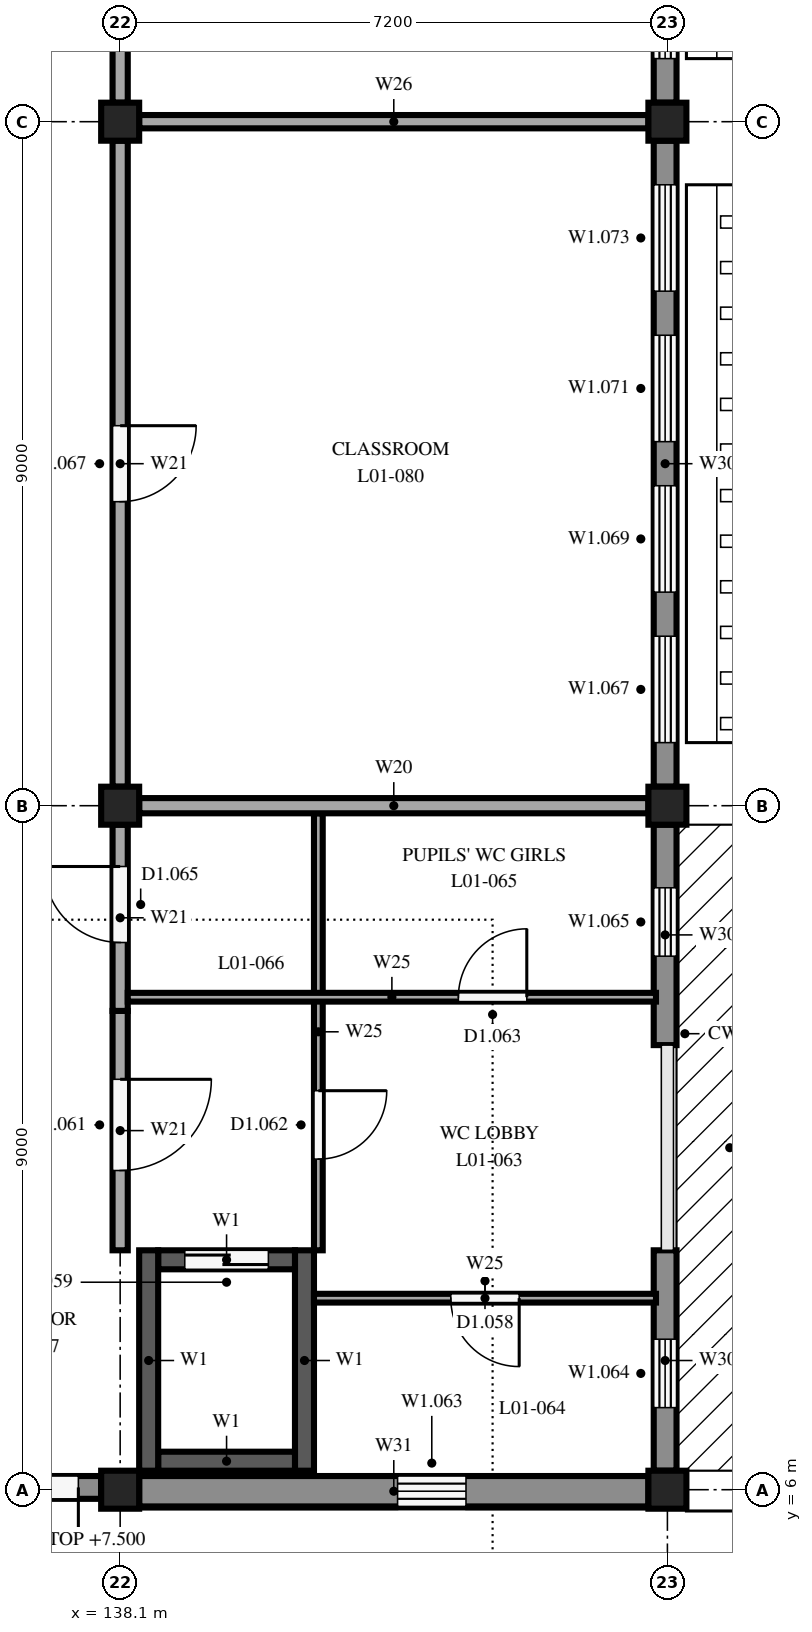
"""IFC4 building model, lengths in metres.
Left out: names, types, materials, properties, quantities, classifications, styles, units other than length and angle.
Written with IfcOpenShell. Run it as: python <this file> out.ifc"""

import sys

from ifc_helpers import new_model, si_unit, direction, frame, frame_2d, origin, origin_2d, place, context, subcontext, project, spatial, rectangle, extrude, element, fill, save


model = new_model("IFC4")
c1 = context("Model", 3, precision=1e-05, world=origin(), true_north=direction((0.0, 1.0)))
c2 = subcontext(c1, "Body", "Model", "MODEL_VIEW")
j1 = project(units=[si_unit("LENGTHUNIT", "METRE"), si_unit("PLANEANGLEUNIT", "RADIAN")], contexts=[c1])
p1 = place(None, origin())
s1 = spatial("IfcSite", under=j1, at=p1, CompositionType="ELEMENT")
p2 = place(p1, origin())
s2 = spatial("IfcBuilding", under=s1, at=p2, CompositionType="ELEMENT")
p3 = place(p2, frame((0.0, 0.0, 4.5)))
s3 = spatial("IfcBuildingStorey", under=s2, at=p3, CompositionType="ELEMENT", Elevation=4.5)
for number, where, z_axis, x_axis in (
    (1, (138.1, 6.0, 0.0), (0.0, 0.0, 1.0), (1.0, 0.0, 0.0)),
    (2, (138.1, 15.0, 0.0), (0.0, 0.0, 1.0), (1.0, 0.0, 0.0)),
    (3, (138.1, 24.0, 0.0), (0.0, 0.0, 1.0), (1.0, 0.0, 0.0)),
    (4, (145.3, 6.0, 0.0), (0.0, 0.0, 1.0), (1.0, 0.0, 0.0)),
    (5, (145.3, 15.0, 0.0), (0.0, 0.0, 1.0), (1.0, 0.0, 0.0)),
    (6, (145.3, 24.0, 0.0), (0.0, 0.0, 1.0), (1.0, 0.0, 0.0)),
):
    element("IfcColumn", number, at=place(p3, frame(where, z_axis=z_axis, x_axis=x_axis)), inside=s3, PredefinedType="COLUMN", context=c2, shape_type="SweptSolid", body=[
        extrude(rectangle(XDim=0.5, YDim=0.5, at=origin_2d()), origin(), (0.0, 0.0, 1.0), 3.35),
    ])
for number, where, z_axis, x_axis in (
    (7, (138.475, 6.25, 0.0), (0.0, 0.0, 1.0), (0.0, 1.0, 0.0)),
    (8, (140.525, 6.25, 0.0), (0.0, 0.0, 1.0), (0.0, 1.0, 0.0)),
):
    element("IfcWall", number, at=place(p3, frame(where, z_axis=z_axis, x_axis=x_axis)), inside=s3, PredefinedType="SHEAR", context=c2, shape_type="SweptSolid", body=[
        extrude(rectangle(XDim=2.9, YDim=0.25, at=frame_2d((1.45, 0.0))), origin(), (0.0, 0.0, 1.0), 3.35),
    ])
p4 = place(p3, frame((138.6, 6.375, 0.0), z_axis=(0.0, 0.0, 1.0), x_axis=(1.0, 0.0, 0.0)))
e9 = element("IfcWall", 9, at=p4, inside=s3, PredefinedType="SHEAR", context=c2, shape_type="SweptSolid", body=[
    extrude(rectangle(XDim=1.8, YDim=0.25, at=frame_2d((0.9, 0.0))), origin(), (0.0, 0.0, 1.0), 3.35),
])
p5 = place(p3, frame((138.6, 9.025, 0.0), z_axis=(0.0, 0.0, 1.0), x_axis=(1.0, 0.0, 0.0)))
e10 = element("IfcWall", 10, at=p5, inside=s3, PredefinedType="SHEAR", context=c2, shape_type="SweptSolid", body=[
    extrude(rectangle(XDim=1.8, YDim=0.25, at=frame_2d((0.9, 0.0))), origin(), (0.0, 0.0, 1.0), 3.35),
])
p6 = place(p5, frame((0.35, 0.0, 0.0)))
e11 = element("IfcOpeningElement", 11, at=p6, cuts=e10, PredefinedType="OPENING", context=c2, shape_type="SweptSolid", body=[
    extrude(rectangle(XDim=1.1, YDim=2.1, at=frame_2d((0.55, 1.05))), frame((0.0, 0.135, 0.0), z_axis=(0.0, -1.0, 0.0), x_axis=(1.0, 0.0, 0.0)), (0.0, 0.0, 1.0), 0.27),
])
p7 = place(p3, frame((145.27, 9.15, 0.0), z_axis=(0.0, 0.0, 1.0), x_axis=(0.0, -1.0, 0.0)))
e12 = element("IfcWall", 12, at=p7, inside=s3, PredefinedType="STANDARD", context=c2, shape_type="SweptSolid", body=[
    extrude(rectangle(XDim=2.9, YDim=0.3, at=frame_2d((1.45, 0.0))), origin(), (0.0, 0.0, 1.0), 2.85),
])
p8 = place(p7, frame((1.17, 0.0, 1.6)))
e13 = element("IfcOpeningElement", 13, at=p8, cuts=e12, PredefinedType="OPENING", context=c2, shape_type="SweptSolid", body=[
    extrude(rectangle(XDim=0.9, YDim=1.0, at=frame_2d((0.45, 0.5))), frame((0.0, 0.16, 0.0), z_axis=(0.0, -1.0, 0.0), x_axis=(1.0, 0.0, 0.0)), (0.0, 0.0, 1.0), 0.32),
])
p9 = place(p3, frame((145.27, 14.75, 0.0), z_axis=(0.0, 0.0, 1.0), x_axis=(0.0, -1.0, 0.0)))
e14 = element("IfcWall", 14, at=p9, inside=s3, PredefinedType="STANDARD", context=c2, shape_type="SweptSolid", body=[
    extrude(rectangle(XDim=2.9, YDim=0.3, at=frame_2d((1.45, 0.0))), origin(), (0.0, 0.0, 1.0), 2.85),
])
p10 = place(p9, frame((0.83, 0.0, 1.6)))
e15 = element("IfcOpeningElement", 15, at=p10, cuts=e14, PredefinedType="OPENING", context=c2, shape_type="SweptSolid", body=[
    extrude(rectangle(XDim=0.9, YDim=1.0, at=frame_2d((0.45, 0.5))), frame((0.0, 0.16, 0.0), z_axis=(0.0, -1.0, 0.0), x_axis=(1.0, 0.0, 0.0)), (0.0, 0.0, 1.0), 0.32),
])
p11 = place(p3, frame((145.27, 23.75, 0.0), z_axis=(0.0, 0.0, 1.0), x_axis=(0.0, -1.0, 0.0)))
e16 = element("IfcWall", 16, at=p11, inside=s3, PredefinedType="STANDARD", context=c2, shape_type="SweptSolid", body=[
    extrude(rectangle(XDim=8.5, YDim=0.3, at=frame_2d((4.25, 0.0))), origin(), (0.0, 0.0, 1.0), 2.85),
])
p12 = place(p11, frame((6.52, 0.0, 0.6)))
e17 = element("IfcOpeningElement", 17, at=p12, cuts=e16, PredefinedType="OPENING", context=c2, shape_type="SweptSolid", body=[
    extrude(rectangle(XDim=1.4, YDim=2.2, at=frame_2d((0.7, 1.1))), frame((0.0, 0.16, 0.0), z_axis=(0.0, -1.0, 0.0), x_axis=(1.0, 0.0, 0.0)), (0.0, 0.0, 1.0), 0.32),
])
p13 = place(p11, frame((4.54, 0.0, 0.6)))
e18 = element("IfcOpeningElement", 18, at=p13, cuts=e16, PredefinedType="OPENING", context=c2, shape_type="SweptSolid", body=[
    extrude(rectangle(XDim=1.4, YDim=2.2, at=frame_2d((0.7, 1.1))), frame((0.0, 0.16, 0.0), z_axis=(0.0, -1.0, 0.0), x_axis=(1.0, 0.0, 0.0)), (0.0, 0.0, 1.0), 0.32),
])
p14 = place(p11, frame((2.56, 0.0, 0.6)))
e19 = element("IfcOpeningElement", 19, at=p14, cuts=e16, PredefinedType="OPENING", context=c2, shape_type="SweptSolid", body=[
    extrude(rectangle(XDim=1.4, YDim=2.2, at=frame_2d((0.7, 1.1))), frame((0.0, 0.16, 0.0), z_axis=(0.0, -1.0, 0.0), x_axis=(1.0, 0.0, 0.0)), (0.0, 0.0, 1.0), 0.32),
])
p15 = place(p11, frame((0.58, 0.0, 0.6)))
e20 = element("IfcOpeningElement", 20, at=p15, cuts=e16, PredefinedType="OPENING", context=c2, shape_type="SweptSolid", body=[
    extrude(rectangle(XDim=1.4, YDim=2.2, at=frame_2d((0.7, 1.1))), frame((0.0, 0.16, 0.0), z_axis=(0.0, -1.0, 0.0), x_axis=(1.0, 0.0, 0.0)), (0.0, 0.0, 1.0), 0.32),
])
p16 = place(p3, frame((145.27, 32.75, 0.0), z_axis=(0.0, 0.0, 1.0), x_axis=(0.0, -1.0, 0.0)))
e21 = element("IfcWall", 21, at=p16, inside=s3, PredefinedType="STANDARD", context=c2, shape_type="SweptSolid", body=[
    extrude(rectangle(XDim=8.5, YDim=0.3, at=frame_2d((4.25, 0.0))), origin(), (0.0, 0.0, 1.0), 2.85),
])
p17 = place(p16, frame((6.52, 0.0, 0.6)))
e22 = element("IfcOpeningElement", 22, at=p17, cuts=e21, PredefinedType="OPENING", context=c2, shape_type="SweptSolid", body=[
    extrude(rectangle(XDim=1.4, YDim=2.2, at=frame_2d((0.7, 1.1))), frame((0.0, 0.16, 0.0), z_axis=(0.0, -1.0, 0.0), x_axis=(1.0, 0.0, 0.0)), (0.0, 0.0, 1.0), 0.32),
])
p18 = place(p16, frame((4.54, 0.0, 0.6)))
e23 = element("IfcOpeningElement", 23, at=p18, cuts=e21, PredefinedType="OPENING", context=c2, shape_type="SweptSolid", body=[
    extrude(rectangle(XDim=1.4, YDim=2.2, at=frame_2d((0.7, 1.1))), frame((0.0, 0.16, 0.0), z_axis=(0.0, -1.0, 0.0), x_axis=(1.0, 0.0, 0.0)), (0.0, 0.0, 1.0), 0.32),
])
p19 = place(p16, frame((2.56, 0.0, 0.6)))
e24 = element("IfcOpeningElement", 24, at=p19, cuts=e21, PredefinedType="OPENING", context=c2, shape_type="SweptSolid", body=[
    extrude(rectangle(XDim=1.4, YDim=2.2, at=frame_2d((0.7, 1.1))), frame((0.0, 0.16, 0.0), z_axis=(0.0, -1.0, 0.0), x_axis=(1.0, 0.0, 0.0)), (0.0, 0.0, 1.0), 0.32),
])
p20 = place(p16, frame((0.58, 0.0, 0.6)))
e25 = element("IfcOpeningElement", 25, at=p20, cuts=e21, PredefinedType="OPENING", context=c2, shape_type="SweptSolid", body=[
    extrude(rectangle(XDim=1.4, YDim=2.2, at=frame_2d((0.7, 1.1))), frame((0.0, 0.16, 0.0), z_axis=(0.0, -1.0, 0.0), x_axis=(1.0, 0.0, 0.0)), (0.0, 0.0, 1.0), 0.32),
])
p21 = place(p3, frame((137.85, 6.03, 0.0), z_axis=(0.0, 0.0, 1.0), x_axis=(-1.0, 0.0, 0.0)))
e26 = element("IfcWall", 26, at=p21, inside=s3, PredefinedType="STANDARD", context=c2, shape_type="SweptSolid", body=[
    extrude(rectangle(XDim=2.2, YDim=0.3, at=frame_2d((1.1, 0.0))), origin(), (0.0, 0.0, 1.0), 3.0),
])
p22 = place(p21, frame((0.3, 0.0, 0.0)))
e27 = element("IfcOpeningElement", 27, at=p22, cuts=e26, PredefinedType="OPENING", context=c2, shape_type="SweptSolid", body=[
    extrude(rectangle(XDim=1.6, YDim=2.4, at=frame_2d((0.8, 1.2))), frame((0.0, 0.16, 0.0), z_axis=(0.0, -1.0, 0.0), x_axis=(1.0, 0.0, 0.0)), (0.0, 0.0, 1.0), 0.32),
])
p23 = place(p3, frame((145.05, 5.98, 0.0), z_axis=(0.0, 0.0, 1.0), x_axis=(-1.0, 0.0, 0.0)))
e28 = element("IfcWall", 28, at=p23, inside=s3, PredefinedType="STANDARD", context=c2, shape_type="SweptSolid", body=[
    extrude(rectangle(XDim=6.7, YDim=0.4, at=frame_2d((3.35, 0.0))), origin(), (0.0, 0.0, 1.0), 2.9),
])
p24 = place(p23, frame((2.4, 0.0, 1.6)))
e29 = element("IfcOpeningElement", 29, at=p24, cuts=e28, PredefinedType="OPENING", context=c2, shape_type="SweptSolid", body=[
    extrude(rectangle(XDim=0.9, YDim=1.0, at=frame_2d((0.45, 0.5))), frame((0.0, 0.21, 0.0), z_axis=(0.0, -1.0, 0.0), x_axis=(1.0, 0.0, 0.0)), (0.0, 0.0, 1.0), 0.42),
])
p25 = place(p3, frame((138.1, 12.3, 0.0), z_axis=(0.0, 0.0, 1.0), x_axis=(0.0, -1.0, 0.0)))
e30 = element("IfcWall", 30, at=p25, inside=s3, PredefinedType="PARTITIONING", context=c2, shape_type="SweptSolid", body=[
    extrude(rectangle(XDim=3.15, YDim=0.2, at=frame_2d((1.575, 0.0))), origin(), (0.0, 0.0, 1.0), 2.9),
])
p26 = place(p25, frame((0.9, 0.0, 0.0)))
e31 = element("IfcOpeningElement", 31, at=p26, cuts=e30, PredefinedType="OPENING", context=c2, shape_type="SweptSolid", body=[
    extrude(rectangle(XDim=1.2, YDim=2.1, at=frame_2d((0.6, 1.05))), frame((0.0, 0.11, 0.0), z_axis=(0.0, -1.0, 0.0), x_axis=(1.0, 0.0, 0.0)), (0.0, 0.0, 1.0), 0.22),
])
p27 = place(p3, frame((138.1, 12.3, 0.0), z_axis=(0.0, 0.0, 1.0), x_axis=(0.0, 1.0, 0.0)))
e32 = element("IfcWall", 32, at=p27, inside=s3, PredefinedType="PARTITIONING", context=c2, shape_type="SweptSolid", body=[
    extrude(rectangle(XDim=2.45, YDim=0.2, at=frame_2d((1.225, 0.0))), origin(), (0.0, 0.0, 1.0), 2.9),
])
p28 = place(p27, frame((0.9, 0.0, 0.0)))
e33 = element("IfcOpeningElement", 33, at=p28, cuts=e32, PredefinedType="OPENING", context=c2, shape_type="SweptSolid", body=[
    extrude(rectangle(XDim=1.0, YDim=2.1, at=frame_2d((0.5, 1.05))), frame((0.0, 0.11, 0.0), z_axis=(0.0, -1.0, 0.0), x_axis=(1.0, 0.0, 0.0)), (0.0, 0.0, 1.0), 0.22),
])
p29 = place(p3, frame((138.35, 15.0, 0.0), z_axis=(0.0, 0.0, 1.0), x_axis=(1.0, 0.0, 0.0)))
e34 = element("IfcWall", 34, at=p29, inside=s3, PredefinedType="PARTITIONING", context=c2, shape_type="SweptSolid", body=[
    extrude(rectangle(XDim=6.7, YDim=0.2, at=frame_2d((3.35, 0.0))), origin(), (0.0, 0.0, 1.0), 2.9),
])
p30 = place(p3, frame((140.708, 14.9, 0.0), z_axis=(0.0, 0.0, 1.0), x_axis=(0.0, -1.0, 0.0)))
e35 = element("IfcWall", 35, at=p30, inside=s3, PredefinedType="PARTITIONING", context=c2, shape_type="SweptSolid", body=[
    extrude(rectangle(XDim=5.75, YDim=0.115, at=frame_2d((2.875, 0.0))), origin(), (0.0, 0.0, 1.0), 3.35),
])
p31 = place(p30, frame((3.65, 0.0, 0.0)))
e36 = element("IfcOpeningElement", 36, at=p31, cuts=e35, PredefinedType="OPENING", context=c2, shape_type="SweptSolid", body=[
    extrude(rectangle(XDim=0.9, YDim=2.1, at=frame_2d((0.45, 1.05))), frame((0.0, 0.067, 0.0), z_axis=(0.0, -1.0, 0.0), x_axis=(1.0, 0.0, 0.0)), (0.0, 0.0, 1.0), 0.135),
])
p32 = place(p3, frame((145.15, 8.52, 0.0), z_axis=(0.0, 0.0, 1.0), x_axis=(-1.0, 0.0, 0.0)))
e37 = element("IfcWall", 37, at=p32, inside=s3, PredefinedType="PARTITIONING", context=c2, shape_type="SweptSolid", body=[
    extrude(rectangle(XDim=4.5, YDim=0.115, at=frame_2d((2.25, 0.0))), origin(), (0.0, 0.0, 1.0), 3.35),
])
p33 = place(p32, frame((1.8, 0.0, 0.0)))
e38 = element("IfcOpeningElement", 38, at=p33, cuts=e37, PredefinedType="OPENING", context=c2, shape_type="SweptSolid", body=[
    extrude(rectangle(XDim=0.9, YDim=2.1, at=frame_2d((0.45, 1.05))), frame((0.0, 0.067, 0.0), z_axis=(0.0, -1.0, 0.0), x_axis=(1.0, 0.0, 0.0)), (0.0, 0.0, 1.0), 0.135),
])
p34 = place(p3, frame((138.2, 12.48, 0.0), z_axis=(0.0, 0.0, 1.0), x_axis=(1.0, 0.0, 0.0)))
e39 = element("IfcWall", 39, at=p34, inside=s3, PredefinedType="PARTITIONING", context=c2, shape_type="SweptSolid", body=[
    extrude(rectangle(XDim=6.95, YDim=0.115, at=frame_2d((3.475, 0.0))), origin(), (0.0, 0.0, 1.0), 3.35),
])
p35 = place(p34, frame((4.35, 0.0, 0.0)))
e40 = element("IfcOpeningElement", 40, at=p35, cuts=e39, PredefinedType="OPENING", context=c2, shape_type="SweptSolid", body=[
    extrude(rectangle(XDim=0.9, YDim=2.1, at=frame_2d((0.45, 1.05))), frame((0.0, 0.067, 0.0), z_axis=(0.0, -1.0, 0.0), x_axis=(1.0, 0.0, 0.0)), (0.0, 0.0, 1.0), 0.135),
])
p36 = place(p3, frame((138.1, 23.75, 0.0), z_axis=(0.0, 0.0, 1.0), x_axis=(0.0, -1.0, 0.0)))
e41 = element("IfcWall", 41, at=p36, inside=s3, PredefinedType="PARTITIONING", context=c2, shape_type="SweptSolid", body=[
    extrude(rectangle(XDim=8.5, YDim=0.2, at=frame_2d((4.25, 0.0))), origin(), (0.0, 0.0, 1.0), 2.9),
])
p37 = place(p36, frame((3.75, 0.0, 0.0)))
e42 = element("IfcOpeningElement", 42, at=p37, cuts=e41, PredefinedType="OPENING", context=c2, shape_type="SweptSolid", body=[
    extrude(rectangle(XDim=1.0, YDim=2.1, at=frame_2d((0.5, 1.05))), frame((0.0, 0.11, 0.0), z_axis=(0.0, -1.0, 0.0), x_axis=(1.0, 0.0, 0.0)), (0.0, 0.0, 1.0), 0.22),
])
p38 = place(p3, frame((138.1, 32.75, 0.0), z_axis=(0.0, 0.0, 1.0), x_axis=(0.0, -1.0, 0.0)))
e43 = element("IfcWall", 43, at=p38, inside=s3, PredefinedType="PARTITIONING", context=c2, shape_type="SweptSolid", body=[
    extrude(rectangle(XDim=8.5, YDim=0.2, at=frame_2d((4.25, 0.0))), origin(), (0.0, 0.0, 1.0), 2.9),
])
p39 = place(p38, frame((5.919, 0.0, 0.0)))
e44 = element("IfcOpeningElement", 44, at=p39, cuts=e43, PredefinedType="OPENING", context=c2, shape_type="SweptSolid", body=[
    extrude(rectangle(XDim=1.0, YDim=2.1, at=frame_2d((0.5, 1.05))), frame((0.0, 0.11, 0.0), z_axis=(0.0, -1.0, 0.0), x_axis=(1.0, 0.0, 0.0)), (0.0, 0.0, 1.0), 0.22),
])
p40 = place(p38, frame((1.581, 0.0, 0.0)))
e45 = element("IfcOpeningElement", 45, at=p40, cuts=e43, PredefinedType="OPENING", context=c2, shape_type="SweptSolid", body=[
    extrude(rectangle(XDim=1.0, YDim=2.1, at=frame_2d((0.5, 1.05))), frame((0.0, 0.11, 0.0), z_axis=(0.0, -1.0, 0.0), x_axis=(1.0, 0.0, 0.0)), (0.0, 0.0, 1.0), 0.22),
])
p41 = place(p3, frame((138.35, 24.0, 0.0), z_axis=(0.0, 0.0, 1.0), x_axis=(1.0, 0.0, 0.0)))
e46 = element("IfcWall", 46, at=p41, inside=s3, PredefinedType="PARTITIONING", context=c2, shape_type="SweptSolid", body=[
    extrude(rectangle(XDim=6.7, YDim=0.175, at=frame_2d((3.35, 0.0))), origin(), (0.0, 0.0, 1.0), 2.9),
])
p42 = place(p8, origin())
e47 = element("IfcWindow", 47, at=p42, inside=s3, PartitioningType="SINGLE_PANEL", PredefinedType="WINDOW", context=c2, shape_type="SweptSolid", body=[
    extrude(rectangle(XDim=0.9, YDim=1.0, at=frame_2d((0.45, 0.5))), frame((0.0, 0.03, 0.0), z_axis=(0.0, -1.0, 0.0), x_axis=(1.0, 0.0, 0.0)), (0.0, 0.0, 1.0), 0.06),
])
fill(e13, e47)
p43 = place(p10, origin())
e48 = element("IfcWindow", 48, at=p43, inside=s3, PartitioningType="SINGLE_PANEL", PredefinedType="WINDOW", context=c2, shape_type="SweptSolid", body=[
    extrude(rectangle(XDim=0.9, YDim=1.0, at=frame_2d((0.45, 0.5))), frame((0.0, 0.03, 0.0), z_axis=(0.0, -1.0, 0.0), x_axis=(1.0, 0.0, 0.0)), (0.0, 0.0, 1.0), 0.06),
])
fill(e15, e48)
p44 = place(p12, origin())
e49 = element("IfcWindow", 49, at=p44, inside=s3, PartitioningType="DOUBLE_PANEL_VERTICAL", PredefinedType="WINDOW", context=c2, shape_type="SweptSolid", body=[
    extrude(rectangle(XDim=1.4, YDim=2.2, at=frame_2d((0.7, 1.1))), frame((0.0, 0.03, 0.0), z_axis=(0.0, -1.0, 0.0), x_axis=(1.0, 0.0, 0.0)), (0.0, 0.0, 1.0), 0.06),
])
fill(e17, e49)
p45 = place(p13, origin())
e50 = element("IfcWindow", 50, at=p45, inside=s3, PartitioningType="DOUBLE_PANEL_VERTICAL", PredefinedType="WINDOW", context=c2, shape_type="SweptSolid", body=[
    extrude(rectangle(XDim=1.4, YDim=2.2, at=frame_2d((0.7, 1.1))), frame((0.0, 0.03, 0.0), z_axis=(0.0, -1.0, 0.0), x_axis=(1.0, 0.0, 0.0)), (0.0, 0.0, 1.0), 0.06),
])
fill(e18, e50)
p46 = place(p14, origin())
e51 = element("IfcWindow", 51, at=p46, inside=s3, PartitioningType="DOUBLE_PANEL_VERTICAL", PredefinedType="WINDOW", context=c2, shape_type="SweptSolid", body=[
    extrude(rectangle(XDim=1.4, YDim=2.2, at=frame_2d((0.7, 1.1))), frame((0.0, 0.03, 0.0), z_axis=(0.0, -1.0, 0.0), x_axis=(1.0, 0.0, 0.0)), (0.0, 0.0, 1.0), 0.06),
])
fill(e19, e51)
p47 = place(p15, origin())
e52 = element("IfcWindow", 52, at=p47, inside=s3, PartitioningType="DOUBLE_PANEL_VERTICAL", PredefinedType="WINDOW", context=c2, shape_type="SweptSolid", body=[
    extrude(rectangle(XDim=1.4, YDim=2.2, at=frame_2d((0.7, 1.1))), frame((0.0, 0.03, 0.0), z_axis=(0.0, -1.0, 0.0), x_axis=(1.0, 0.0, 0.0)), (0.0, 0.0, 1.0), 0.06),
])
fill(e20, e52)
p48 = place(p17, origin())
e53 = element("IfcWindow", 53, at=p48, inside=s3, PartitioningType="DOUBLE_PANEL_VERTICAL", PredefinedType="WINDOW", context=c2, shape_type="SweptSolid", body=[
    extrude(rectangle(XDim=1.4, YDim=2.2, at=frame_2d((0.7, 1.1))), frame((0.0, 0.03, 0.0), z_axis=(0.0, -1.0, 0.0), x_axis=(1.0, 0.0, 0.0)), (0.0, 0.0, 1.0), 0.06),
])
fill(e22, e53)
p49 = place(p22, origin())
e54 = element("IfcDoor", 54, at=p49, inside=s3, OperationType="DOUBLE_DOOR_SINGLE_SWING", PredefinedType="DOOR", context=c2, shape_type="SweptSolid", body=[
    extrude(rectangle(XDim=1.6, YDim=2.4, at=frame_2d((0.8, 1.2))), frame((0.0, 0.025, 0.0), z_axis=(0.0, -1.0, 0.0), x_axis=(1.0, 0.0, 0.0)), (0.0, 0.0, 1.0), 0.05),
])
fill(e27, e54)
p50 = place(p24, origin())
e55 = element("IfcWindow", 55, at=p50, inside=s3, PartitioningType="SINGLE_PANEL", PredefinedType="WINDOW", context=c2, shape_type="SweptSolid", body=[
    extrude(rectangle(XDim=0.9, YDim=1.0, at=frame_2d((0.45, 0.5))), frame((0.0, 0.03, 0.0), z_axis=(0.0, -1.0, 0.0), x_axis=(1.0, 0.0, 0.0)), (0.0, 0.0, 1.0), 0.06),
])
fill(e29, e55)
p51 = place(p26, origin())
e56 = element("IfcDoor", 56, at=p51, inside=s3, OperationType="SINGLE_SWING_LEFT", PredefinedType="DOOR", context=c2, shape_type="SweptSolid", body=[
    extrude(rectangle(XDim=1.2, YDim=2.1, at=frame_2d((0.6, 1.05))), frame((0.0, 0.025, 0.0), z_axis=(0.0, -1.0, 0.0), x_axis=(1.0, 0.0, 0.0)), (0.0, 0.0, 1.0), 0.05),
])
fill(e31, e56)
p52 = place(p28, origin())
e57 = element("IfcDoor", 57, at=p52, inside=s3, OperationType="SINGLE_SWING_RIGHT", PredefinedType="DOOR", context=c2, shape_type="SweptSolid", body=[
    extrude(rectangle(XDim=1.0, YDim=2.1, at=frame_2d((0.5, 1.05))), frame((0.0, 0.025, 0.0), z_axis=(0.0, -1.0, 0.0), x_axis=(1.0, 0.0, 0.0)), (0.0, 0.0, 1.0), 0.05),
])
fill(e33, e57)
p53 = place(p31, origin())
e58 = element("IfcDoor", 58, at=p53, inside=s3, OperationType="SINGLE_SWING_LEFT", PredefinedType="DOOR", context=c2, shape_type="SweptSolid", body=[
    extrude(rectangle(XDim=0.9, YDim=2.1, at=frame_2d((0.45, 1.05))), frame((0.0, 0.025, 0.0), z_axis=(0.0, -1.0, 0.0), x_axis=(1.0, 0.0, 0.0)), (0.0, 0.0, 1.0), 0.05),
])
fill(e36, e58)
p54 = place(p33, origin())
e59 = element("IfcDoor", 59, at=p54, inside=s3, OperationType="SINGLE_SWING_LEFT", PredefinedType="DOOR", context=c2, shape_type="SweptSolid", body=[
    extrude(rectangle(XDim=0.9, YDim=2.1, at=frame_2d((0.45, 1.05))), frame((0.0, 0.025, 0.0), z_axis=(0.0, -1.0, 0.0), x_axis=(1.0, 0.0, 0.0)), (0.0, 0.0, 1.0), 0.05),
])
fill(e38, e59)
p55 = place(p35, origin())
e60 = element("IfcDoor", 60, at=p55, inside=s3, OperationType="SINGLE_SWING_RIGHT", PredefinedType="DOOR", context=c2, shape_type="SweptSolid", body=[
    extrude(rectangle(XDim=0.9, YDim=2.1, at=frame_2d((0.45, 1.05))), frame((0.0, 0.025, 0.0), z_axis=(0.0, -1.0, 0.0), x_axis=(1.0, 0.0, 0.0)), (0.0, 0.0, 1.0), 0.05),
])
fill(e40, e60)
p56 = place(p37, origin())
e61 = element("IfcDoor", 61, at=p56, inside=s3, OperationType="SINGLE_SWING_LEFT", PredefinedType="DOOR", context=c2, shape_type="SweptSolid", body=[
    extrude(rectangle(XDim=1.0, YDim=2.1, at=frame_2d((0.5, 1.05))), frame((0.0, 0.025, 0.0), z_axis=(0.0, -1.0, 0.0), x_axis=(1.0, 0.0, 0.0)), (0.0, 0.0, 1.0), 0.05),
])
fill(e42, e61)
p57 = place(p6, origin())
e62 = element("IfcDoor", 62, at=p57, inside=s3, OperationType="SLIDING_TO_LEFT", PredefinedType="DOOR", context=c2, shape_type="SweptSolid", body=[
    extrude(rectangle(XDim=1.1, YDim=2.1, at=frame_2d((0.55, 1.05))), frame((0.0, 0.025, 0.0), z_axis=(0.0, -1.0, 0.0), x_axis=(1.0, 0.0, 0.0)), (0.0, 0.0, 1.0), 0.05),
])
fill(e11, e62)
save(model, sys.argv[1])
